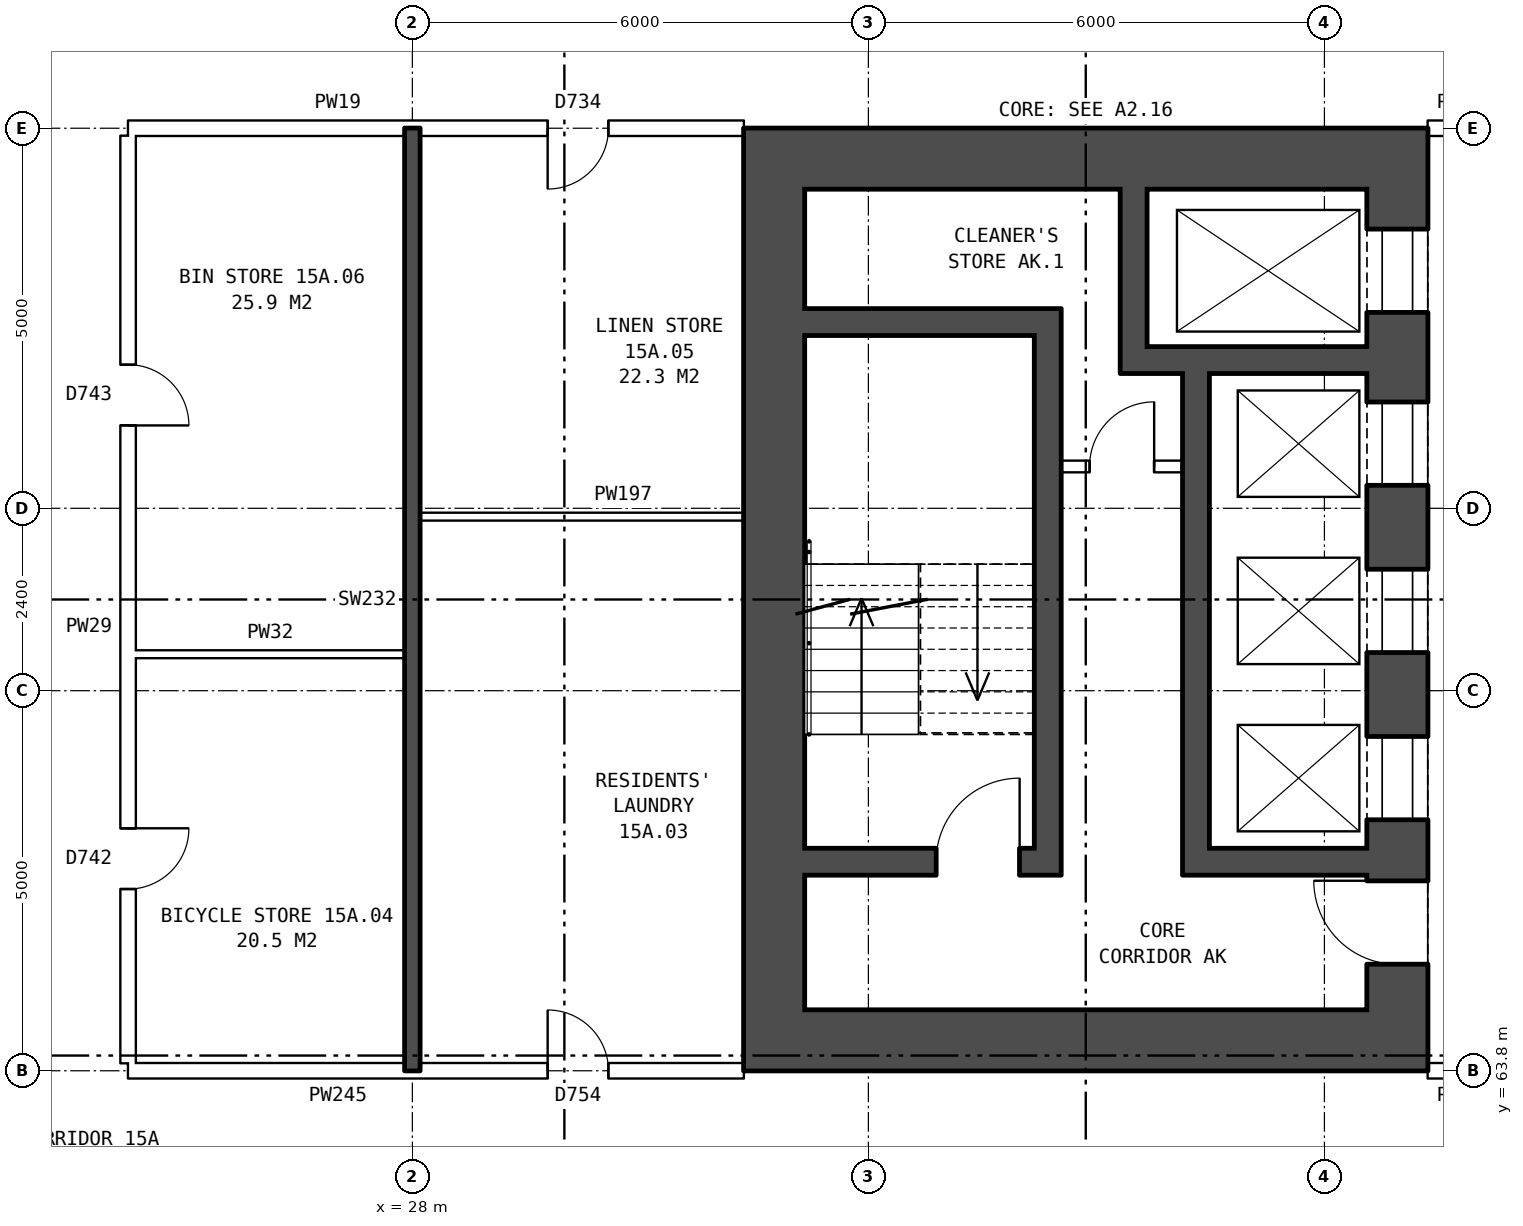
"""IFC4 building model, lengths in metres.
Left out: names, types, materials, properties, quantities, classifications, styles, units other than length and angle.
Written with IfcOpenShell. Run it as: python <this file> out.ifc"""

import sys

from ifc_helpers import new_model, si_unit, direction, frame, frame_2d, origin, place, context, subcontext, project, spatial, rectangle, extrude, element, fill, save


model = new_model("IFC4")
c1 = context("Model", 3, precision=1e-05, world=origin(), true_north=direction((0.0, 1.0)))
c2 = subcontext(c1, "Body", "Model", "MODEL_VIEW")
j1 = project(units=[si_unit("LENGTHUNIT", "METRE"), si_unit("PLANEANGLEUNIT", "RADIAN")], contexts=[c1])
p1 = place(None, origin())
s1 = spatial("IfcSite", under=j1, at=p1, CompositionType="ELEMENT")
p2 = place(p1, origin())
s2 = spatial("IfcBuilding", under=s1, at=p2, CompositionType="ELEMENT")
p3 = place(p2, frame((0.0, 0.0, 56.7)))
s3 = spatial("IfcBuildingStorey", under=s2, at=p3, CompositionType="ELEMENT", Elevation=56.7)
p4 = place(p3, frame((40.96, 75.4, 0.0), z_axis=(0.0, 0.0, 1.0), x_axis=(0.0, -1.0, 0.0)))
e1 = element("IfcWall", 1, at=p4, inside=s3, PredefinedType="SHEAR", context=c2, shape_type="SweptSolid", body=[
    extrude(rectangle(XDim=10.8, YDim=0.8, at=frame_2d((5.4, 0.0))), origin(), (0.0, 0.0, 1.0), 2.85),
])
p5 = place(p4, frame((0.525, 0.0, 0.0)))
e2 = element("IfcOpeningElement", 2, at=p5, cuts=e1, PredefinedType="OPENING", context=c2, shape_type="SweptSolid", body=[
    extrude(rectangle(XDim=1.1, YDim=2.1, at=frame_2d((0.55, 1.05))), frame((0.0, 0.41, 0.0), z_axis=(0.0, -1.0, 0.0), x_axis=(1.0, 0.0, 0.0)), (0.0, 0.0, 1.0), 0.82),
])
p6 = place(p4, frame((2.8, 0.0, 0.0)))
e3 = element("IfcOpeningElement", 3, at=p6, cuts=e1, PredefinedType="OPENING", context=c2, shape_type="SweptSolid", body=[
    extrude(rectangle(XDim=1.1, YDim=2.1, at=frame_2d((0.55, 1.05))), frame((0.0, 0.41, 0.0), z_axis=(0.0, -1.0, 0.0), x_axis=(1.0, 0.0, 0.0)), (0.0, 0.0, 1.0), 0.82),
])
p7 = place(p4, frame((5.0, 0.0, 0.0)))
e4 = element("IfcOpeningElement", 4, at=p7, cuts=e1, PredefinedType="OPENING", context=c2, shape_type="SweptSolid", body=[
    extrude(rectangle(XDim=1.1, YDim=2.1, at=frame_2d((0.55, 1.05))), frame((0.0, 0.41, 0.0), z_axis=(0.0, -1.0, 0.0), x_axis=(1.0, 0.0, 0.0)), (0.0, 0.0, 1.0), 0.82),
])
p8 = place(p4, frame((7.2, 0.0, 0.0)))
e5 = element("IfcOpeningElement", 5, at=p8, cuts=e1, PredefinedType="OPENING", context=c2, shape_type="SweptSolid", body=[
    extrude(rectangle(XDim=1.1, YDim=2.1, at=frame_2d((0.55, 1.05))), frame((0.0, 0.41, 0.0), z_axis=(0.0, -1.0, 0.0), x_axis=(1.0, 0.0, 0.0)), (0.0, 0.0, 1.0), 0.82),
])
p9 = place(p4, frame((9.1, 0.0, 0.0)))
e6 = element("IfcOpeningElement", 6, at=p9, cuts=e1, PredefinedType="OPENING", context=c2, shape_type="SweptSolid", body=[
    extrude(rectangle(XDim=1.1, YDim=2.1, at=frame_2d((0.55, 1.05))), frame((0.0, 0.41, 0.0), z_axis=(0.0, -1.0, 0.0), x_axis=(1.0, 0.0, 0.0)), (0.0, 0.0, 1.0), 0.82),
])
p10 = place(p3, frame((32.76, 75.4, 0.0), z_axis=(0.0, 0.0, 1.0), x_axis=(0.0, -1.0, 0.0)))
e7 = element("IfcWall", 7, at=p10, inside=s3, PredefinedType="SHEAR", context=c2, shape_type="SweptSolid", body=[
    extrude(rectangle(XDim=10.8, YDim=0.8, at=frame_2d((5.4, 0.0))), origin(), (0.0, 0.0, 1.0), 2.85),
])
for number, where, z_axis, x_axis in (
    (8, (41.36, 75.8, 0.0), (0.0, 0.0, 1.0), (-1.0, 0.0, 0.0)),
    (9, (41.36, 64.2, 0.0), (0.0, 0.0, 1.0), (-1.0, 0.0, 0.0)),
):
    element("IfcWall", number, at=place(p3, frame(where, z_axis=z_axis, x_axis=x_axis)), inside=s3, PredefinedType="SHEAR", context=c2, shape_type="SweptSolid", body=[
        extrude(rectangle(XDim=9.0, YDim=0.8, at=frame_2d((4.5, 0.0))), origin(), (0.0, 0.0, 1.0), 2.85),
    ])
p11 = place(p3, frame((36.185, 73.65, 0.0), z_axis=(0.0, 0.0, 1.0), x_axis=(-1.0, 0.0, 0.0)))
e10 = element("IfcWall", 10, at=p11, inside=s3, PredefinedType="SHEAR", context=c2, shape_type="SweptSolid", body=[
    extrude(rectangle(XDim=3.025, YDim=0.35, at=frame_2d((1.513, 0.0))), origin(), (0.0, 0.0, 1.0), 2.85),
])
p12 = place(p3, frame((40.56, 73.15, 0.0), z_axis=(0.0, 0.0, 1.0), x_axis=(-1.0, 0.0, 0.0)))
e11 = element("IfcWall", 11, at=p12, inside=s3, PredefinedType="SHEAR", context=c2, shape_type="SweptSolid", body=[
    extrude(rectangle(XDim=3.245, YDim=0.35, at=frame_2d((1.623, 0.0))), origin(), (0.0, 0.0, 1.0), 2.85),
])
p13 = place(p3, frame((38.135, 71.75, 0.0), z_axis=(0.0, 0.0, 1.0), x_axis=(-1.0, 0.0, 0.0)))
e12 = element("IfcWall", 12, at=p13, inside=s3, PredefinedType="PARTITIONING", context=c2, shape_type="SweptSolid", body=[
    extrude(rectangle(XDim=1.6, YDim=0.15, at=frame_2d((0.8, 0.0))), origin(), (0.0, 0.0, 1.0), 2.85),
])
p14 = place(p13, frame((0.375, 0.0, 0.0)))
e13 = element("IfcOpeningElement", 13, at=p14, cuts=e12, PredefinedType="OPENING", context=c2, shape_type="SweptSolid", body=[
    extrude(rectangle(XDim=0.85, YDim=2.1, at=frame_2d((0.425, 1.05))), frame((0.0, 0.085, 0.0), z_axis=(0.0, -1.0, 0.0), x_axis=(1.0, 0.0, 0.0)), (0.0, 0.0, 1.0), 0.17),
])
p15 = place(p3, frame((40.56, 66.55, 0.0), z_axis=(0.0, 0.0, 1.0), x_axis=(-1.0, 0.0, 0.0)))
e14 = element("IfcWall", 14, at=p15, inside=s3, PredefinedType="SHEAR", context=c2, shape_type="SweptSolid", body=[
    extrude(rectangle(XDim=2.075, YDim=0.35, at=frame_2d((1.038, 0.0))), origin(), (0.0, 0.0, 1.0), 2.85),
])
p16 = place(p3, frame((36.185, 66.55, 0.0), z_axis=(0.0, 0.0, 1.0), x_axis=(-1.0, 0.0, 0.0)))
e15 = element("IfcWall", 15, at=p16, inside=s3, PredefinedType="SHEAR", context=c2, shape_type="SweptSolid", body=[
    extrude(rectangle(XDim=3.025, YDim=0.35, at=frame_2d((1.513, 0.0))), origin(), (0.0, 0.0, 1.0), 2.85),
])
p17 = place(p16, frame((0.195, 0.0, 0.0)))
e16 = element("IfcOpeningElement", 16, at=p17, cuts=e15, PredefinedType="OPENING", context=c2, shape_type="SweptSolid", body=[
    extrude(rectangle(XDim=1.1, YDim=2.1, at=frame_2d((0.55, 1.05))), frame((0.0, 0.185, 0.0), z_axis=(0.0, -1.0, 0.0), x_axis=(1.0, 0.0, 0.0)), (0.0, 0.0, 1.0), 0.37),
])
p18 = place(p3, frame((38.31, 72.975, 0.0), z_axis=(0.0, 0.0, 1.0), x_axis=(0.0, -1.0, 0.0)))
e17 = element("IfcWall", 17, at=p18, inside=s3, PredefinedType="SHEAR", context=c2, shape_type="SweptSolid", body=[
    extrude(rectangle(XDim=6.6, YDim=0.35, at=frame_2d((3.3, 0.0))), origin(), (0.0, 0.0, 1.0), 2.85),
])
p19 = place(p3, frame((37.49, 75.4, 0.0), z_axis=(0.0, 0.0, 1.0), x_axis=(0.0, -1.0, 0.0)))
e18 = element("IfcWall", 18, at=p19, inside=s3, PredefinedType="SHEAR", context=c2, shape_type="SweptSolid", body=[
    extrude(rectangle(XDim=2.075, YDim=0.35, at=frame_2d((1.038, 0.0))), origin(), (0.0, 0.0, 1.0), 2.85),
])
p20 = place(p3, frame((36.36, 73.825, 0.0), z_axis=(0.0, 0.0, 1.0), x_axis=(0.0, -1.0, 0.0)))
e19 = element("IfcWall", 19, at=p20, inside=s3, PredefinedType="SHEAR", context=c2, shape_type="SweptSolid", body=[
    extrude(rectangle(XDim=7.45, YDim=0.35, at=frame_2d((3.725, 0.0))), origin(), (0.0, 0.0, 1.0), 2.85),
])
p21 = place(p3, frame((24.26, 63.8, 0.0), z_axis=(0.0, 0.0, 1.0), x_axis=(1.0, 0.0, 0.0)))
e20 = element("IfcWall", 20, at=p21, inside=s3, PredefinedType="PARTITIONING", context=c2, shape_type="SweptSolid", body=[
    extrude(rectangle(XDim=8.1, YDim=0.2, at=frame_2d((4.05, 0.0))), origin(), (0.0, 0.0, 1.0), 2.85),
])
p22 = place(p21, frame((5.52, 0.0, 0.0)))
e21 = element("IfcOpeningElement", 21, at=p22, cuts=e20, PredefinedType="OPENING", context=c2, shape_type="SweptSolid", body=[
    extrude(rectangle(XDim=0.8, YDim=2.1, at=frame_2d((0.4, 1.05))), frame((0.0, 0.11, 0.0), z_axis=(0.0, -1.0, 0.0), x_axis=(1.0, 0.0, 0.0)), (0.0, 0.0, 1.0), 0.22),
])
p23 = place(p3, frame((41.36, 63.8, 0.0), z_axis=(0.0, 0.0, 1.0), x_axis=(1.0, 0.0, 0.0)))
e22 = element("IfcWall", 22, at=p23, inside=s3, PredefinedType="PARTITIONING", context=c2, shape_type="SweptSolid", body=[
    extrude(rectangle(XDim=3.0, YDim=0.2, at=frame_2d((1.5, 0.0))), origin(), (0.0, 0.0, 1.0), 2.85),
])
p24 = place(p23, frame((1.0, 0.0, 0.0)))
e23 = element("IfcOpeningElement", 23, at=p24, cuts=e22, PredefinedType="OPENING", context=c2, shape_type="SweptSolid", body=[
    extrude(rectangle(XDim=1.0, YDim=2.1, at=frame_2d((0.5, 1.05))), frame((0.0, 0.11, 0.0), z_axis=(0.0, -1.0, 0.0), x_axis=(1.0, 0.0, 0.0)), (0.0, 0.0, 1.0), 0.22),
])
p25 = place(p3, frame((24.36, 69.28, 0.0), z_axis=(0.0, 0.0, 1.0), x_axis=(1.0, 0.0, 0.0)))
e24 = element("IfcWall", 24, at=p25, inside=s3, PredefinedType="PARTITIONING", context=c2, shape_type="SweptSolid", body=[
    extrude(rectangle(XDim=3.54, YDim=0.1, at=frame_2d((1.77, 0.0))), origin(), (0.0, 0.0, 1.0), 2.85),
])
p26 = place(p3, frame((28.1, 71.09, 0.0), z_axis=(0.0, 0.0, 1.0), x_axis=(1.0, 0.0, 0.0)))
e25 = element("IfcWall", 25, at=p26, inside=s3, PredefinedType="PARTITIONING", context=c2, shape_type="SweptSolid", body=[
    extrude(rectangle(XDim=4.26, YDim=0.1, at=frame_2d((2.13, 0.0))), origin(), (0.0, 0.0, 1.0), 2.85),
])
p27 = place(p3, frame((24.26, 76.2, 0.0), z_axis=(0.0, 0.0, 1.0), x_axis=(1.0, 0.0, 0.0)))
e26 = element("IfcWall", 26, at=p27, inside=s3, PredefinedType="PARTITIONING", context=c2, shape_type="SweptSolid", body=[
    extrude(rectangle(XDim=8.1, YDim=0.2, at=frame_2d((4.05, 0.0))), origin(), (0.0, 0.0, 1.0), 2.85),
])
p28 = place(p27, frame((5.52, 0.0, 0.0)))
e27 = element("IfcOpeningElement", 27, at=p28, cuts=e26, PredefinedType="OPENING", context=c2, shape_type="SweptSolid", body=[
    extrude(rectangle(XDim=0.8, YDim=2.1, at=frame_2d((0.4, 1.05))), frame((0.0, 0.11, 0.0), z_axis=(0.0, -1.0, 0.0), x_axis=(1.0, 0.0, 0.0)), (0.0, 0.0, 1.0), 0.22),
])
p29 = place(p3, frame((41.36, 76.2, 0.0), z_axis=(0.0, 0.0, 1.0), x_axis=(1.0, 0.0, 0.0)))
e28 = element("IfcWall", 28, at=p29, inside=s3, PredefinedType="PARTITIONING", context=c2, shape_type="SweptSolid", body=[
    extrude(rectangle(XDim=3.0, YDim=0.2, at=frame_2d((1.5, 0.0))), origin(), (0.0, 0.0, 1.0), 2.85),
])
p30 = place(p29, frame((1.0, 0.0, 0.0)))
e29 = element("IfcOpeningElement", 29, at=p30, cuts=e28, PredefinedType="OPENING", context=c2, shape_type="SweptSolid", body=[
    extrude(rectangle(XDim=1.0, YDim=2.1, at=frame_2d((0.5, 1.05))), frame((0.0, 0.11, 0.0), z_axis=(0.0, -1.0, 0.0), x_axis=(1.0, 0.0, 0.0)), (0.0, 0.0, 1.0), 0.22),
])
p31 = place(p3, frame((24.26, 63.9, 0.0), z_axis=(0.0, 0.0, 1.0), x_axis=(0.0, 1.0, 0.0)))
e30 = element("IfcWall", 30, at=p31, inside=s3, PredefinedType="PARTITIONING", context=c2, shape_type="SweptSolid", body=[
    extrude(rectangle(XDim=12.2, YDim=0.2, at=frame_2d((6.1, 0.0))), origin(), (0.0, 0.0, 1.0), 2.85),
])
p32 = place(p31, frame((2.29, 0.0, 0.0)))
e31 = element("IfcOpeningElement", 31, at=p32, cuts=e30, PredefinedType="OPENING", context=c2, shape_type="SweptSolid", body=[
    extrude(rectangle(XDim=0.8, YDim=2.1, at=frame_2d((0.4, 1.05))), frame((0.0, 0.11, 0.0), z_axis=(0.0, -1.0, 0.0), x_axis=(1.0, 0.0, 0.0)), (0.0, 0.0, 1.0), 0.22),
])
p33 = place(p31, frame((8.39, 0.0, 0.0)))
e32 = element("IfcOpeningElement", 32, at=p33, cuts=e30, PredefinedType="OPENING", context=c2, shape_type="SweptSolid", body=[
    extrude(rectangle(XDim=0.8, YDim=2.1, at=frame_2d((0.4, 1.05))), frame((0.0, 0.11, 0.0), z_axis=(0.0, -1.0, 0.0), x_axis=(1.0, 0.0, 0.0)), (0.0, 0.0, 1.0), 0.22),
])
p34 = place(p3, frame((28.0, 63.8, 0.0), z_axis=(0.0, 0.0, 1.0), x_axis=(0.0, 1.0, 0.0)))
e33 = element("IfcWall", 33, at=p34, inside=s3, PredefinedType="SOLIDWALL", context=c2, shape_type="SweptSolid", body=[
    extrude(rectangle(XDim=12.4, YDim=0.2, at=frame_2d((6.2, 0.0))), origin(), (0.0, 0.0, 1.0), 2.85),
])
p35 = place(p5, origin())
e34 = element("IfcDoor", 34, at=p35, inside=s3, OperationType="DOUBLE_DOOR_SLIDING", PredefinedType="DOOR", context=c2, shape_type="SweptSolid", body=[
    extrude(rectangle(XDim=1.1, YDim=2.1, at=frame_2d((0.55, 1.05))), frame((0.0, -0.335, 0.0), z_axis=(0.0, -1.0, 0.0), x_axis=(1.0, 0.0, 0.0)), (0.0, 0.0, 1.0), 0.05),
])
fill(e2, e34)
p36 = place(p6, origin())
e35 = element("IfcDoor", 35, at=p36, inside=s3, OperationType="DOUBLE_DOOR_SLIDING", PredefinedType="DOOR", context=c2, shape_type="SweptSolid", body=[
    extrude(rectangle(XDim=1.1, YDim=2.1, at=frame_2d((0.55, 1.05))), frame((0.0, -0.335, 0.0), z_axis=(0.0, -1.0, 0.0), x_axis=(1.0, 0.0, 0.0)), (0.0, 0.0, 1.0), 0.05),
])
fill(e3, e35)
p37 = place(p7, origin())
e36 = element("IfcDoor", 36, at=p37, inside=s3, OperationType="DOUBLE_DOOR_SLIDING", PredefinedType="DOOR", context=c2, shape_type="SweptSolid", body=[
    extrude(rectangle(XDim=1.1, YDim=2.1, at=frame_2d((0.55, 1.05))), frame((0.0, -0.335, 0.0), z_axis=(0.0, -1.0, 0.0), x_axis=(1.0, 0.0, 0.0)), (0.0, 0.0, 1.0), 0.05),
])
fill(e4, e36)
p38 = place(p8, origin())
e37 = element("IfcDoor", 37, at=p38, inside=s3, OperationType="DOUBLE_DOOR_SLIDING", PredefinedType="DOOR", context=c2, shape_type="SweptSolid", body=[
    extrude(rectangle(XDim=1.1, YDim=2.1, at=frame_2d((0.55, 1.05))), frame((0.0, -0.335, 0.0), z_axis=(0.0, -1.0, 0.0), x_axis=(1.0, 0.0, 0.0)), (0.0, 0.0, 1.0), 0.05),
])
fill(e5, e37)
p39 = place(p9, frame((1.1, 0.0, 0.0), z_axis=(0.0, 0.0, 1.0), x_axis=(-1.0, 0.0, 0.0)))
e38 = element("IfcDoor", 38, at=p39, inside=s3, OperationType="SINGLE_SWING_RIGHT", PredefinedType="DOOR", context=c2, shape_type="SweptSolid", body=[
    extrude(rectangle(XDim=1.1, YDim=2.1, at=frame_2d((0.55, 1.05))), frame((0.0, 0.385, 0.0), z_axis=(0.0, -1.0, 0.0), x_axis=(1.0, 0.0, 0.0)), (0.0, 0.0, 1.0), 0.05),
])
fill(e6, e38)
p40 = place(p17, frame((1.1, 0.0, 0.0), z_axis=(0.0, 0.0, 1.0), x_axis=(-1.0, 0.0, 0.0)))
e39 = element("IfcDoor", 39, at=p40, inside=s3, OperationType="SINGLE_SWING_RIGHT", PredefinedType="DOOR", context=c2, shape_type="SweptSolid", body=[
    extrude(rectangle(XDim=1.1, YDim=2.1, at=frame_2d((0.55, 1.05))), frame((0.0, 0.025, 0.0), z_axis=(0.0, -1.0, 0.0), x_axis=(1.0, 0.0, 0.0)), (0.0, 0.0, 1.0), 0.05),
])
fill(e16, e39)
p41 = place(p14, frame((0.85, 0.0, 0.0), z_axis=(0.0, 0.0, 1.0), x_axis=(-1.0, 0.0, 0.0)))
e40 = element("IfcDoor", 40, at=p41, inside=s3, OperationType="SINGLE_SWING_RIGHT", PredefinedType="DOOR", context=c2, shape_type="SweptSolid", body=[
    extrude(rectangle(XDim=0.85, YDim=2.1, at=frame_2d((0.425, 1.05))), frame((0.0, 0.025, 0.0), z_axis=(0.0, -1.0, 0.0), x_axis=(1.0, 0.0, 0.0)), (0.0, 0.0, 1.0), 0.05),
])
fill(e13, e40)
p42 = place(p22, origin())
e41 = element("IfcDoor", 41, at=p42, inside=s3, OperationType="SINGLE_SWING_LEFT", PredefinedType="DOOR", context=c2, shape_type="SweptSolid", body=[
    extrude(rectangle(XDim=0.8, YDim=2.1, at=frame_2d((0.4, 1.05))), frame((0.0, 0.025, 0.0), z_axis=(0.0, -1.0, 0.0), x_axis=(1.0, 0.0, 0.0)), (0.0, 0.0, 1.0), 0.05),
])
fill(e21, e41)
p43 = place(p32, frame((0.8, 0.0, 0.0), z_axis=(0.0, 0.0, 1.0), x_axis=(-1.0, 0.0, 0.0)))
e42 = element("IfcDoor", 42, at=p43, inside=s3, OperationType="SINGLE_SWING_LEFT", PredefinedType="DOOR", context=c2, shape_type="SweptSolid", body=[
    extrude(rectangle(XDim=0.8, YDim=2.1, at=frame_2d((0.4, 1.05))), frame((0.0, 0.025, 0.0), z_axis=(0.0, -1.0, 0.0), x_axis=(1.0, 0.0, 0.0)), (0.0, 0.0, 1.0), 0.05),
])
fill(e31, e42)
p44 = place(p28, frame((0.8, 0.0, 0.0), z_axis=(0.0, 0.0, 1.0), x_axis=(-1.0, 0.0, 0.0)))
e43 = element("IfcDoor", 43, at=p44, inside=s3, OperationType="SINGLE_SWING_RIGHT", PredefinedType="DOOR", context=c2, shape_type="SweptSolid", body=[
    extrude(rectangle(XDim=0.8, YDim=2.1, at=frame_2d((0.4, 1.05))), frame((0.0, 0.025, 0.0), z_axis=(0.0, -1.0, 0.0), x_axis=(1.0, 0.0, 0.0)), (0.0, 0.0, 1.0), 0.05),
])
fill(e27, e43)
p45 = place(p33, frame((0.8, 0.0, 0.0), z_axis=(0.0, 0.0, 1.0), x_axis=(-1.0, 0.0, 0.0)))
e44 = element("IfcDoor", 44, at=p45, inside=s3, OperationType="SINGLE_SWING_RIGHT", PredefinedType="DOOR", context=c2, shape_type="SweptSolid", body=[
    extrude(rectangle(XDim=0.8, YDim=2.1, at=frame_2d((0.4, 1.05))), frame((0.0, 0.025, 0.0), z_axis=(0.0, -1.0, 0.0), x_axis=(1.0, 0.0, 0.0)), (0.0, 0.0, 1.0), 0.05),
])
fill(e32, e44)
save(model, sys.argv[1])
